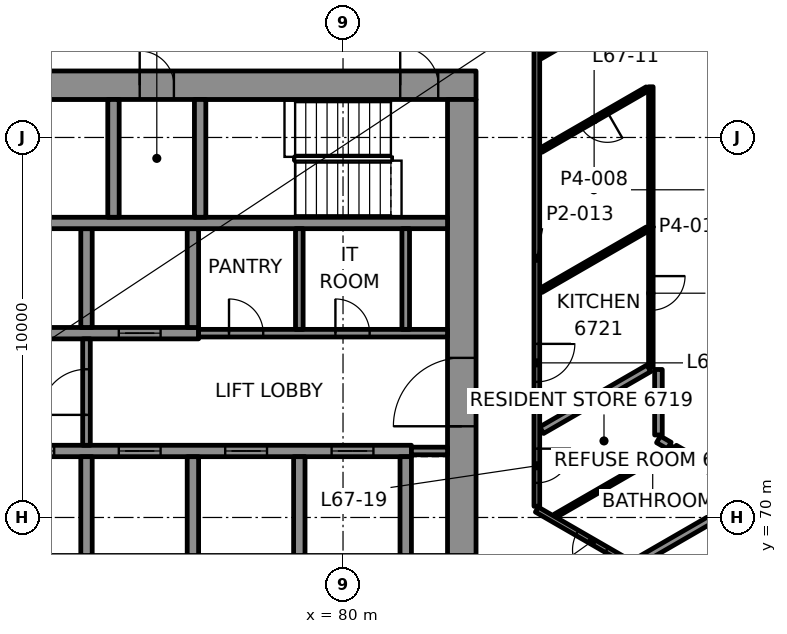
"""IFC4 building model, lengths in metres.
Left out: names, types, materials, properties, quantities, classifications, styles, units other than length and angle.
Written with IfcOpenShell. Run it as: python <this file> out.ifc"""

import sys

from ifc_helpers import new_model, si_unit, direction, frame, frame_2d, origin, place, context, subcontext, project, spatial, rectangle, extrude, element, fill, save


model = new_model("IFC4")
c1 = context("Model", 3, precision=1e-05, world=origin(), true_north=direction((0.0, 1.0)))
c2 = subcontext(c1, "Body", "Model", "MODEL_VIEW")
j1 = project(units=[si_unit("LENGTHUNIT", "METRE"), si_unit("PLANEANGLEUNIT", "RADIAN")], contexts=[c1])
p1 = place(None, origin())
s1 = spatial("IfcSite", under=j1, at=p1, CompositionType="ELEMENT")
p2 = place(p1, origin())
s2 = spatial("IfcBuilding", under=s1, at=p2, CompositionType="ELEMENT")
p3 = place(p2, frame((0.0, 0.0, 281.1)))
s3 = spatial("IfcBuildingStorey", under=s2, at=p3, CompositionType="ELEMENT", Elevation=281.1)
p4 = place(p3, frame((66.5, 81.375, 0.0), z_axis=(0.0, 0.0, 1.0), x_axis=(1.0, 0.0, 0.0)))
e1 = element("IfcWall", 1, at=p4, inside=s3, PredefinedType="SHEAR", context=c2, shape_type="SweptSolid", body=[
    extrude(rectangle(XDim=17.0, YDim=0.75, at=frame_2d((8.5, 0.0))), origin(), (0.0, 0.0, 1.0), 3.3),
])
p5 = place(p4, frame((1.195, 0.0, 0.0)))
e2 = element("IfcOpeningElement", 2, at=p5, cuts=e1, PredefinedType="OPENING", context=c2, shape_type="SweptSolid", body=[
    extrude(rectangle(XDim=1.0, YDim=2.1, at=frame_2d((0.5, 1.05))), frame((0.0, 0.385, 0.0), z_axis=(0.0, -1.0, 0.0), x_axis=(1.0, 0.0, 0.0)), (0.0, 0.0, 1.0), 0.77),
])
p6 = place(p4, frame((15.005, 0.0, 0.0)))
e3 = element("IfcOpeningElement", 3, at=p6, cuts=e1, PredefinedType="OPENING", context=c2, shape_type="SweptSolid", body=[
    extrude(rectangle(XDim=1.0, YDim=2.1, at=frame_2d((0.5, 1.05))), frame((0.0, 0.385, 0.0), z_axis=(0.0, -1.0, 0.0), x_axis=(1.0, 0.0, 0.0)), (0.0, 0.0, 1.0), 0.77),
])
p7 = place(p4, frame((8.15, 0.0, 0.0)))
e4 = element("IfcOpeningElement", 4, at=p7, cuts=e1, PredefinedType="OPENING", context=c2, shape_type="SweptSolid", body=[
    extrude(rectangle(XDim=0.9, YDim=2.1, at=frame_2d((0.45, 1.05))), frame((0.0, 0.385, 0.0), z_axis=(0.0, -1.0, 0.0), x_axis=(1.0, 0.0, 0.0)), (0.0, 0.0, 1.0), 0.77),
])
p8 = place(p3, frame((83.125, 69.0, 0.0), z_axis=(0.0, 0.0, 1.0), x_axis=(0.0, 1.0, 0.0)))
e5 = element("IfcWall", 5, at=p8, inside=s3, PredefinedType="SHEAR", context=c2, shape_type="SweptSolid", body=[
    extrude(rectangle(XDim=12.0, YDim=0.75, at=frame_2d((6.0, 0.0))), origin(), (0.0, 0.0, 1.0), 3.3),
])
p9 = place(p8, frame((3.4, 0.0, 0.0)))
e6 = element("IfcOpeningElement", 6, at=p9, cuts=e5, PredefinedType="OPENING", context=c2, shape_type="SweptSolid", body=[
    extrude(rectangle(XDim=1.8, YDim=2.1, at=frame_2d((0.9, 1.05))), frame((0.0, 0.385, 0.0), z_axis=(0.0, -1.0, 0.0), x_axis=(1.0, 0.0, 0.0)), (0.0, 0.0, 1.0), 0.77),
])
p10 = place(p3, frame((70.3, 71.75, 0.0), z_axis=(0.0, 0.0, 1.0), x_axis=(1.0, 0.0, 0.0)))
e7 = element("IfcWall", 7, at=p10, inside=s3, PredefinedType="SHEAR", context=c2, shape_type="SweptSolid", body=[
    extrude(rectangle(XDim=11.5, YDim=0.3, at=frame_2d((5.75, 0.0))), origin(), (0.0, 0.0, 1.0), 3.3),
])
p11 = place(p10, frame((1.0, 0.0, 0.0)))
e8 = element("IfcOpeningElement", 8, at=p11, cuts=e7, PredefinedType="OPENING", context=c2, shape_type="SweptSolid", body=[
    extrude(rectangle(XDim=1.1, YDim=2.1, at=frame_2d((0.55, 1.05))), frame((0.0, 0.16, 0.0), z_axis=(0.0, -1.0, 0.0), x_axis=(1.0, 0.0, 0.0)), (0.0, 0.0, 1.0), 0.32),
])
p12 = place(p10, frame((3.8, 0.0, 0.0)))
e9 = element("IfcOpeningElement", 9, at=p12, cuts=e7, PredefinedType="OPENING", context=c2, shape_type="SweptSolid", body=[
    extrude(rectangle(XDim=1.1, YDim=2.1, at=frame_2d((0.55, 1.05))), frame((0.0, 0.16, 0.0), z_axis=(0.0, -1.0, 0.0), x_axis=(1.0, 0.0, 0.0)), (0.0, 0.0, 1.0), 0.32),
])
p13 = place(p10, frame((6.6, 0.0, 0.0)))
e10 = element("IfcOpeningElement", 10, at=p13, cuts=e7, PredefinedType="OPENING", context=c2, shape_type="SweptSolid", body=[
    extrude(rectangle(XDim=1.1, YDim=2.1, at=frame_2d((0.55, 1.05))), frame((0.0, 0.16, 0.0), z_axis=(0.0, -1.0, 0.0), x_axis=(1.0, 0.0, 0.0)), (0.0, 0.0, 1.0), 0.32),
])
p14 = place(p10, frame((9.4, 0.0, 0.0)))
e11 = element("IfcOpeningElement", 11, at=p14, cuts=e7, PredefinedType="OPENING", context=c2, shape_type="SweptSolid", body=[
    extrude(rectangle(XDim=1.1, YDim=2.1, at=frame_2d((0.55, 1.05))), frame((0.0, 0.16, 0.0), z_axis=(0.0, -1.0, 0.0), x_axis=(1.0, 0.0, 0.0)), (0.0, 0.0, 1.0), 0.32),
])
p15 = place(p3, frame((70.3, 74.85, 0.0), z_axis=(0.0, 0.0, 1.0), x_axis=(1.0, 0.0, 0.0)))
e12 = element("IfcWall", 12, at=p15, inside=s3, PredefinedType="SHEAR", context=c2, shape_type="SweptSolid", body=[
    extrude(rectangle(XDim=5.9, YDim=0.3, at=frame_2d((2.95, 0.0))), origin(), (0.0, 0.0, 1.0), 3.3),
])
p16 = place(p15, frame((3.8, 0.0, 0.0)))
e13 = element("IfcOpeningElement", 13, at=p16, cuts=e12, PredefinedType="OPENING", context=c2, shape_type="SweptSolid", body=[
    extrude(rectangle(XDim=1.1, YDim=2.1, at=frame_2d((0.55, 1.05))), frame((0.0, 0.16, 0.0), z_axis=(0.0, -1.0, 0.0), x_axis=(1.0, 0.0, 0.0)), (0.0, 0.0, 1.0), 0.32),
])
for number, where, z_axis, x_axis in (
    (14, (73.25, 69.0, 0.0), (0.0, 0.0, 1.0), (0.0, 1.0, 0.0)),
    (15, (73.25, 75.0, 0.0), (0.0, 0.0, 1.0), (0.0, 1.0, 0.0)),
    (16, (76.05, 69.0, 0.0), (0.0, 0.0, 1.0), (0.0, 1.0, 0.0)),
    (17, (76.05, 75.0, 0.0), (0.0, 0.0, 1.0), (0.0, 1.0, 0.0)),
    (18, (78.85, 69.0, 0.0), (0.0, 0.0, 1.0), (0.0, 1.0, 0.0)),
    (19, (81.65, 69.0, 0.0), (0.0, 0.0, 1.0), (0.0, 1.0, 0.0)),
):
    element("IfcWall", number, at=place(p3, frame(where, z_axis=z_axis, x_axis=x_axis)), inside=s3, PredefinedType="SHEAR", context=c2, shape_type="SweptSolid", body=[
        extrude(rectangle(XDim=2.6, YDim=0.3, at=frame_2d((1.3, 0.0))), origin(), (0.0, 0.0, 1.0), 3.3),
    ])
p17 = place(p3, frame((67.25, 77.75, 0.0), z_axis=(0.0, 0.0, 1.0), x_axis=(1.0, 0.0, 0.0)))
e20 = element("IfcWall", 20, at=p17, inside=s3, PredefinedType="SHEAR", context=c2, shape_type="SweptSolid", body=[
    extrude(rectangle(XDim=15.5, YDim=0.3, at=frame_2d((7.75, 0.0))), origin(), (0.0, 0.0, 1.0), 3.3),
])
p18 = place(p17, frame((0.445, 0.0, 0.0)))
e21 = element("IfcOpeningElement", 21, at=p18, cuts=e20, PredefinedType="OPENING", context=c2, shape_type="SweptSolid", body=[
    extrude(rectangle(XDim=1.0, YDim=2.1, at=frame_2d((0.5, 1.05))), frame((0.0, 0.16, 0.0), z_axis=(0.0, -1.0, 0.0), x_axis=(1.0, 0.0, 0.0)), (0.0, 0.0, 1.0), 0.32),
])
for number, where, z_axis, x_axis in (
    (22, (73.96, 77.9, 0.0), (0.0, 0.0, 1.0), (0.0, 1.0, 0.0)),
    (23, (76.24, 77.9, 0.0), (0.0, 0.0, 1.0), (0.0, 1.0, 0.0)),
):
    element("IfcWall", number, at=place(p3, frame(where, z_axis=z_axis, x_axis=x_axis)), inside=s3, PredefinedType="SHEAR", context=c2, shape_type="SweptSolid", body=[
        extrude(rectangle(XDim=3.1, YDim=0.3, at=frame_2d((1.55, 0.0))), origin(), (0.0, 0.0, 1.0), 3.3),
    ])
p19 = place(p3, frame((87.741, 68.83, 0.0), z_axis=(0.0, 0.0, 1.0), x_axis=(0.866026579827, 0.499997963029, 0.0)))
e24 = element("IfcWall", 24, at=p19, inside=s3, PredefinedType="PARTITIONING", context=c2, shape_type="SweptSolid", body=[
    extrude(rectangle(XDim=9.179, YDim=0.2, at=frame_2d((4.59, 0.0))), origin(), (0.0, 0.0, 1.0), 2.688),
])
p20 = place(p3, frame((85.585, 70.045, 0.0), z_axis=(0.0, 0.0, 1.0), x_axis=(0.866004928679, 0.500035462246, 0.0)))
e25 = element("IfcWall", 25, at=p20, inside=s3, PredefinedType="PARTITIONING", context=c2, shape_type="SweptSolid", body=[
    extrude(rectangle(XDim=3.578, YDim=0.1, at=frame_2d((1.789, 0.0))), origin(), (0.0, 0.0, 1.0), 2.7),
])
p21 = place(p3, frame((85.227, 72.297, 0.0), z_axis=(0.0, 0.0, 1.0), x_axis=(0.866002113569, 0.500040337666, 0.0)))
e26 = element("IfcWall", 26, at=p21, inside=s3, PredefinedType="PARTITIONING", context=c2, shape_type="SweptSolid", body=[
    extrude(rectangle(XDim=3.258, YDim=0.2, at=frame_2d((1.629, 0.0))), origin(), (0.0, 0.0, 1.0), 2.7),
])
p22 = place(p3, frame((85.21, 75.976, 0.0), z_axis=(0.0, 0.0, 1.0), x_axis=(0.86605210011, 0.499953757757, 0.0)))
e27 = element("IfcWall", 27, at=p22, inside=s3, PredefinedType="PARTITIONING", context=c2, shape_type="SweptSolid", body=[
    extrude(rectangle(XDim=3.228, YDim=0.12, at=frame_2d((1.614, 0.0))), origin(), (0.0, 0.0, 1.0), 2.7),
])
p23 = place(p3, frame((88.005, 81.279, 0.0), z_axis=(0.0, 0.0, 1.0), x_axis=(-0.866000447062, -0.500043223821, 0.0)))
e28 = element("IfcWall", 28, at=p23, inside=s3, PredefinedType="PARTITIONING", context=c2, shape_type="SweptSolid", body=[
    extrude(rectangle(XDim=3.228, YDim=0.12, at=frame_2d((1.614, 0.0))), origin(), (0.0, 0.0, 1.0), 2.7),
])
p24 = place(p23, frame((1.214, 0.0, 0.0)))
e29 = element("IfcOpeningElement", 29, at=p24, cuts=e28, PredefinedType="OPENING", context=c2, shape_type="SweptSolid", body=[
    extrude(rectangle(XDim=0.8, YDim=2.1, at=frame_2d((0.4, 1.05))), frame((0.0, 0.07, 0.0), z_axis=(0.0, -1.0, 0.0), x_axis=(1.0, 0.0, 0.0)), (0.0, 0.0, 1.0), 0.14),
])
p25 = place(p3, frame((85.201, 82.119, 0.0), z_axis=(0.0, 0.0, 1.0), x_axis=(0.866035297817, 0.499982862641, 0.0)))
e30 = element("IfcWall", 30, at=p25, inside=s3, PredefinedType="PARTITIONING", context=c2, shape_type="SweptSolid", body=[
    extrude(rectangle(XDim=4.734, YDim=0.1, at=frame_2d((2.367, 0.0))), origin(), (0.0, 0.0, 1.0), 2.688),
])
p26 = place(p3, frame((88.3, 72.171, 0.0), z_axis=(0.0, 0.0, 1.0), x_axis=(0.0, 1.0, 0.0)))
e31 = element("IfcWall", 31, at=p26, inside=s3, PredefinedType="PARTITIONING", context=c2, shape_type="SweptSolid", body=[
    extrude(rectangle(XDim=1.724, YDim=0.2, at=frame_2d((0.862, 0.0))), origin(), (0.0, 0.0, 1.0), 2.7),
])
p27 = place(p3, frame((88.1, 81.334, 0.0), z_axis=(0.0, 0.0, 1.0), x_axis=(0.0, -1.0, 0.0)))
e32 = element("IfcWall", 32, at=p27, inside=s3, PredefinedType="PARTITIONING", context=c2, shape_type="SweptSolid", body=[
    extrude(rectangle(XDim=7.378, YDim=0.12, at=frame_2d((3.689, 0.0))), origin(), (0.0, 0.0, 1.0), 2.7),
])
p28 = place(p27, frame((4.982, 0.0, 0.0)))
e33 = element("IfcOpeningElement", 33, at=p28, cuts=e32, PredefinedType="OPENING", context=c2, shape_type="SweptSolid", body=[
    extrude(rectangle(XDim=0.9, YDim=2.1, at=frame_2d((0.45, 1.05))), frame((0.0, 0.07, 0.0), z_axis=(0.0, -1.0, 0.0), x_axis=(1.0, 0.0, 0.0)), (0.0, 0.0, 1.0), 0.14),
])
p29 = place(p3, frame((85.1, 83.348, 0.0), z_axis=(0.0, 0.0, 1.0), x_axis=(0.0, -1.0, 0.0)))
e34 = element("IfcWall", 34, at=p29, inside=s3, PredefinedType="PARTITIONING", context=c2, shape_type="SweptSolid", body=[
    extrude(rectangle(XDim=13.053, YDim=0.15, at=frame_2d((6.527, 0.0))), origin(), (0.0, 0.0, 1.0), 2.7),
])
p30 = place(p29, frame((8.78, 0.0, 0.0)))
e35 = element("IfcOpeningElement", 35, at=p30, cuts=e34, PredefinedType="OPENING", context=c2, shape_type="SweptSolid", body=[
    extrude(rectangle(XDim=1.0, YDim=2.1, at=frame_2d((0.5, 1.05))), frame((0.0, 0.085, 0.0), z_axis=(0.0, -1.0, 0.0), x_axis=(1.0, 0.0, 0.0)), (0.0, 0.0, 1.0), 0.17),
])
p31 = place(p29, frame((11.537, 0.0, 0.0)))
e36 = element("IfcOpeningElement", 36, at=p31, cuts=e34, PredefinedType="OPENING", context=c2, shape_type="SweptSolid", body=[
    extrude(rectangle(XDim=0.9, YDim=2.1, at=frame_2d((0.45, 1.05))), frame((0.0, 0.085, 0.0), z_axis=(0.0, -1.0, 0.0), x_axis=(1.0, 0.0, 0.0)), (0.0, 0.0, 1.0), 0.17),
])
p32 = place(p3, frame((90.662, 70.692, 0.0), z_axis=(0.0, 0.0, 1.0), x_axis=(-0.866034963436, 0.499983441833, 0.0)))
e37 = element("IfcWall", 37, at=p32, inside=s3, PredefinedType="PARTITIONING", context=c2, shape_type="SweptSolid", body=[
    extrude(rectangle(XDim=2.24, YDim=0.2, at=frame_2d((1.12, 0.0))), origin(), (0.0, 0.0, 1.0), 2.7),
])
p33 = place(p3, frame((97.014, 63.329, 0.0), z_axis=(0.0, 0.0, 1.0), x_axis=(-0.866023045711, 0.500004084281, 0.0)))
e38 = element("IfcWall", 38, at=p33, inside=s3, PredefinedType="PARTITIONING", context=c2, shape_type="SweptSolid", body=[
    extrude(rectangle(XDim=13.757, YDim=0.15, at=frame_2d((6.879, 0.0))), origin(), (0.0, 0.0, 1.0), 2.7),
])
p34 = place(p33, frame((1.39, 0.0, 0.0)))
e39 = element("IfcOpeningElement", 39, at=p34, cuts=e38, PredefinedType="OPENING", context=c2, shape_type="SweptSolid", body=[
    extrude(rectangle(XDim=0.9, YDim=2.1, at=frame_2d((0.45, 1.05))), frame((0.0, 0.085, 0.0), z_axis=(0.0, -1.0, 0.0), x_axis=(1.0, 0.0, 0.0)), (0.0, 0.0, 1.0), 0.17),
])
p35 = place(p33, frame((4.821, 0.0, 0.0)))
e40 = element("IfcOpeningElement", 40, at=p35, cuts=e38, PredefinedType="OPENING", context=c2, shape_type="SweptSolid", body=[
    extrude(rectangle(XDim=1.0, YDim=2.1, at=frame_2d((0.5, 1.05))), frame((0.0, 0.085, 0.0), z_axis=(0.0, -1.0, 0.0), x_axis=(1.0, 0.0, 0.0)), (0.0, 0.0, 1.0), 0.17),
])
p36 = place(p33, frame((11.634, 0.0, 0.0)))
e41 = element("IfcOpeningElement", 41, at=p36, cuts=e38, PredefinedType="OPENING", context=c2, shape_type="SweptSolid", body=[
    extrude(rectangle(XDim=0.9, YDim=2.1, at=frame_2d((0.45, 1.05))), frame((0.0, 0.085, 0.0), z_axis=(0.0, -1.0, 0.0), x_axis=(1.0, 0.0, 0.0)), (0.0, 0.0, 1.0), 0.17),
])
p37 = place(p3, frame((88.584, 71.892, 0.0), z_axis=(0.0, 0.0, 1.0), x_axis=(-0.865987003449, 0.500066505434, 0.0)))
e42 = element("IfcWall", 42, at=p37, inside=s3, PredefinedType="PARTITIONING", context=c2, shape_type="SweptSolid", body=[
    extrude(rectangle(XDim=0.328, YDim=0.2, at=frame_2d((0.164, 0.0))), origin(), (0.0, 0.0, 1.0), 2.7),
])
p38 = place(p3, frame((81.8, 71.75, 0.0), z_axis=(0.0, 0.0, 1.0), x_axis=(1.0, 0.0, 0.0)))
e43 = element("IfcWall", 43, at=p38, inside=s3, PredefinedType="PARTITIONING", context=c2, shape_type="SweptSolid", body=[
    extrude(rectangle(XDim=0.95, YDim=0.2, at=frame_2d((0.475, 0.0))), origin(), (0.0, 0.0, 1.0), 3.3),
])
p39 = place(p3, frame((76.2, 74.85, 0.0), z_axis=(0.0, 0.0, 1.0), x_axis=(1.0, 0.0, 0.0)))
e44 = element("IfcWall", 44, at=p39, inside=s3, PredefinedType="PARTITIONING", context=c2, shape_type="SweptSolid", body=[
    extrude(rectangle(XDim=6.55, YDim=0.2, at=frame_2d((3.275, 0.0))), origin(), (0.0, 0.0, 1.0), 3.3),
])
p40 = place(p39, frame((0.8, 0.0, 0.0)))
e45 = element("IfcOpeningElement", 45, at=p40, cuts=e44, PredefinedType="OPENING", context=c2, shape_type="SweptSolid", body=[
    extrude(rectangle(XDim=0.9, YDim=2.1, at=frame_2d((0.45, 1.05))), frame((0.0, 0.11, 0.0), z_axis=(0.0, -1.0, 0.0), x_axis=(1.0, 0.0, 0.0)), (0.0, 0.0, 1.0), 0.22),
])
p41 = place(p39, frame((3.6, 0.0, 0.0)))
e46 = element("IfcOpeningElement", 46, at=p41, cuts=e44, PredefinedType="OPENING", context=c2, shape_type="SweptSolid", body=[
    extrude(rectangle(XDim=0.9, YDim=2.1, at=frame_2d((0.45, 1.05))), frame((0.0, 0.11, 0.0), z_axis=(0.0, -1.0, 0.0), x_axis=(1.0, 0.0, 0.0)), (0.0, 0.0, 1.0), 0.22),
])
p42 = place(p3, frame((73.25, 71.9, 0.0), z_axis=(0.0, 0.0, 1.0), x_axis=(0.0, 1.0, 0.0)))
e47 = element("IfcWall", 47, at=p42, inside=s3, PredefinedType="PARTITIONING", context=c2, shape_type="SweptSolid", body=[
    extrude(rectangle(XDim=2.8, YDim=0.2, at=frame_2d((1.4, 0.0))), origin(), (0.0, 0.0, 1.0), 3.3),
])
p43 = place(p42, frame((0.8, 0.0, 0.0)))
e48 = element("IfcOpeningElement", 48, at=p43, cuts=e47, PredefinedType="OPENING", context=c2, shape_type="SweptSolid", body=[
    extrude(rectangle(XDim=1.2, YDim=2.1, at=frame_2d((0.6, 1.05))), frame((0.0, 0.11, 0.0), z_axis=(0.0, -1.0, 0.0), x_axis=(1.0, 0.0, 0.0)), (0.0, 0.0, 1.0), 0.22),
])
for number, where, z_axis, x_axis in (
    (49, (78.85, 74.95, 0.0), (0.0, 0.0, 1.0), (0.0, 1.0, 0.0)),
    (50, (81.65, 74.95, 0.0), (0.0, 0.0, 1.0), (0.0, 1.0, 0.0)),
):
    element("IfcWall", number, at=place(p3, frame(where, z_axis=z_axis, x_axis=x_axis)), inside=s3, PredefinedType="PARTITIONING", context=c2, shape_type="SweptSolid", body=[
        extrude(rectangle(XDim=2.65, YDim=0.2, at=frame_2d((1.325, 0.0))), origin(), (0.0, 0.0, 1.0), 3.3),
    ])
p44 = place(p24, origin())
e51 = element("IfcDoor", 51, at=p44, inside=s3, OperationType="SINGLE_SWING_RIGHT", PredefinedType="DOOR", context=c2, shape_type="SweptSolid", body=[
    extrude(rectangle(XDim=0.8, YDim=2.1, at=frame_2d((0.4, 1.05))), frame((0.0, 0.025, 0.0), z_axis=(0.0, -1.0, 0.0), x_axis=(1.0, 0.0, 0.0)), (0.0, 0.0, 1.0), 0.05),
])
fill(e29, e51)
p45 = place(p28, origin())
e52 = element("IfcDoor", 52, at=p45, inside=s3, OperationType="SINGLE_SWING_RIGHT", PredefinedType="DOOR", context=c2, shape_type="SweptSolid", body=[
    extrude(rectangle(XDim=0.9, YDim=2.1, at=frame_2d((0.45, 1.05))), frame((0.0, 0.025, 0.0), z_axis=(0.0, -1.0, 0.0), x_axis=(1.0, 0.0, 0.0)), (0.0, 0.0, 1.0), 0.05),
])
fill(e33, e52)
p46 = place(p30, origin())
e53 = element("IfcDoor", 53, at=p46, inside=s3, OperationType="SINGLE_SWING_LEFT", PredefinedType="DOOR", context=c2, shape_type="SweptSolid", body=[
    extrude(rectangle(XDim=1.0, YDim=2.1, at=frame_2d((0.5, 1.05))), frame((0.0, 0.025, 0.0), z_axis=(0.0, -1.0, 0.0), x_axis=(1.0, 0.0, 0.0)), (0.0, 0.0, 1.0), 0.05),
])
fill(e35, e53)
p47 = place(p31, origin())
e54 = element("IfcDoor", 54, at=p47, inside=s3, OperationType="SINGLE_SWING_LEFT", PredefinedType="DOOR", context=c2, shape_type="SweptSolid", body=[
    extrude(rectangle(XDim=0.9, YDim=2.1, at=frame_2d((0.45, 1.05))), frame((0.0, 0.025, 0.0), z_axis=(0.0, -1.0, 0.0), x_axis=(1.0, 0.0, 0.0)), (0.0, 0.0, 1.0), 0.05),
])
fill(e36, e54)
p48 = place(p36, origin())
e55 = element("IfcDoor", 55, at=p48, inside=s3, OperationType="SINGLE_SWING_LEFT", PredefinedType="DOOR", context=c2, shape_type="SweptSolid", body=[
    extrude(rectangle(XDim=0.9, YDim=2.1, at=frame_2d((0.45, 1.05))), frame((0.0, 0.025, 0.0), z_axis=(0.0, -1.0, 0.0), x_axis=(1.0, 0.0, 0.0)), (0.0, 0.0, 1.0), 0.05),
])
fill(e41, e55)
p49 = place(p11, origin())
e56 = element("IfcDoor", 56, at=p49, inside=s3, OperationType="DOUBLE_DOOR_SLIDING", PredefinedType="DOOR", context=c2, shape_type="SweptSolid", body=[
    extrude(rectangle(XDim=1.1, YDim=2.1, at=frame_2d((0.55, 1.05))), frame((0.0, 0.025, 0.0), z_axis=(0.0, -1.0, 0.0), x_axis=(1.0, 0.0, 0.0)), (0.0, 0.0, 1.0), 0.05),
])
fill(e8, e56)
p50 = place(p12, origin())
e57 = element("IfcDoor", 57, at=p50, inside=s3, OperationType="DOUBLE_DOOR_SLIDING", PredefinedType="DOOR", context=c2, shape_type="SweptSolid", body=[
    extrude(rectangle(XDim=1.1, YDim=2.1, at=frame_2d((0.55, 1.05))), frame((0.0, 0.025, 0.0), z_axis=(0.0, -1.0, 0.0), x_axis=(1.0, 0.0, 0.0)), (0.0, 0.0, 1.0), 0.05),
])
fill(e9, e57)
p51 = place(p13, origin())
e58 = element("IfcDoor", 58, at=p51, inside=s3, OperationType="DOUBLE_DOOR_SLIDING", PredefinedType="DOOR", context=c2, shape_type="SweptSolid", body=[
    extrude(rectangle(XDim=1.1, YDim=2.1, at=frame_2d((0.55, 1.05))), frame((0.0, 0.025, 0.0), z_axis=(0.0, -1.0, 0.0), x_axis=(1.0, 0.0, 0.0)), (0.0, 0.0, 1.0), 0.05),
])
fill(e10, e58)
p52 = place(p14, origin())
e59 = element("IfcDoor", 59, at=p52, inside=s3, OperationType="DOUBLE_DOOR_SLIDING", PredefinedType="DOOR", context=c2, shape_type="SweptSolid", body=[
    extrude(rectangle(XDim=1.1, YDim=2.1, at=frame_2d((0.55, 1.05))), frame((0.0, 0.025, 0.0), z_axis=(0.0, -1.0, 0.0), x_axis=(1.0, 0.0, 0.0)), (0.0, 0.0, 1.0), 0.05),
])
fill(e11, e59)
p53 = place(p16, origin())
e60 = element("IfcDoor", 60, at=p53, inside=s3, OperationType="DOUBLE_DOOR_SLIDING", PredefinedType="DOOR", context=c2, shape_type="SweptSolid", body=[
    extrude(rectangle(XDim=1.1, YDim=2.1, at=frame_2d((0.55, 1.05))), frame((0.0, 0.025, 0.0), z_axis=(0.0, -1.0, 0.0), x_axis=(1.0, 0.0, 0.0)), (0.0, 0.0, 1.0), 0.05),
])
fill(e13, e60)
p54 = place(p6, origin())
e61 = element("IfcDoor", 61, at=p54, inside=s3, OperationType="SINGLE_SWING_LEFT", PredefinedType="DOOR", context=c2, shape_type="SweptSolid", body=[
    extrude(rectangle(XDim=1.0, YDim=2.1, at=frame_2d((0.5, 1.05))), frame((0.0, 0.095, 0.0), z_axis=(0.0, -1.0, 0.0), x_axis=(1.0, 0.0, 0.0)), (0.0, 0.0, 1.0), 0.19),
])
fill(e3, e61)
p55 = place(p43, origin())
e62 = element("IfcDoor", 62, at=p55, inside=s3, OperationType="SINGLE_SWING_LEFT", PredefinedType="DOOR", context=c2, shape_type="SweptSolid", body=[
    extrude(rectangle(XDim=1.2, YDim=2.1, at=frame_2d((0.6, 1.05))), frame((0.0, 0.025, 0.0), z_axis=(0.0, -1.0, 0.0), x_axis=(1.0, 0.0, 0.0)), (0.0, 0.0, 1.0), 0.05),
])
fill(e48, e62)
p56 = place(p9, origin())
e63 = element("IfcDoor", 63, at=p56, inside=s3, OperationType="SINGLE_SWING_LEFT", PredefinedType="DOOR", context=c2, shape_type="SweptSolid", body=[
    extrude(rectangle(XDim=1.8, YDim=2.1, at=frame_2d((0.9, 1.05))), frame((0.0, 0.095, 0.0), z_axis=(0.0, -1.0, 0.0), x_axis=(1.0, 0.0, 0.0)), (0.0, 0.0, 1.0), 0.19),
])
fill(e6, e63)
p57 = place(p40, origin())
e64 = element("IfcDoor", 64, at=p57, inside=s3, OperationType="SINGLE_SWING_RIGHT", PredefinedType="DOOR", context=c2, shape_type="SweptSolid", body=[
    extrude(rectangle(XDim=0.9, YDim=2.1, at=frame_2d((0.45, 1.05))), frame((0.0, 0.025, 0.0), z_axis=(0.0, -1.0, 0.0), x_axis=(1.0, 0.0, 0.0)), (0.0, 0.0, 1.0), 0.05),
])
fill(e45, e64)
p58 = place(p41, origin())
e65 = element("IfcDoor", 65, at=p58, inside=s3, OperationType="SINGLE_SWING_LEFT", PredefinedType="DOOR", context=c2, shape_type="SweptSolid", body=[
    extrude(rectangle(XDim=0.9, YDim=2.1, at=frame_2d((0.45, 1.05))), frame((0.0, 0.025, 0.0), z_axis=(0.0, -1.0, 0.0), x_axis=(1.0, 0.0, 0.0)), (0.0, 0.0, 1.0), 0.05),
])
fill(e46, e65)
p59 = place(p7, origin())
e66 = element("IfcDoor", 66, at=p59, inside=s3, OperationType="SINGLE_SWING_RIGHT", PredefinedType="DOOR", context=c2, shape_type="SweptSolid", body=[
    extrude(rectangle(XDim=0.9, YDim=2.1, at=frame_2d((0.45, 1.05))), frame((0.0, 0.095, 0.0), z_axis=(0.0, -1.0, 0.0), x_axis=(1.0, 0.0, 0.0)), (0.0, 0.0, 1.0), 0.19),
])
fill(e4, e66)
save(model, sys.argv[1])
